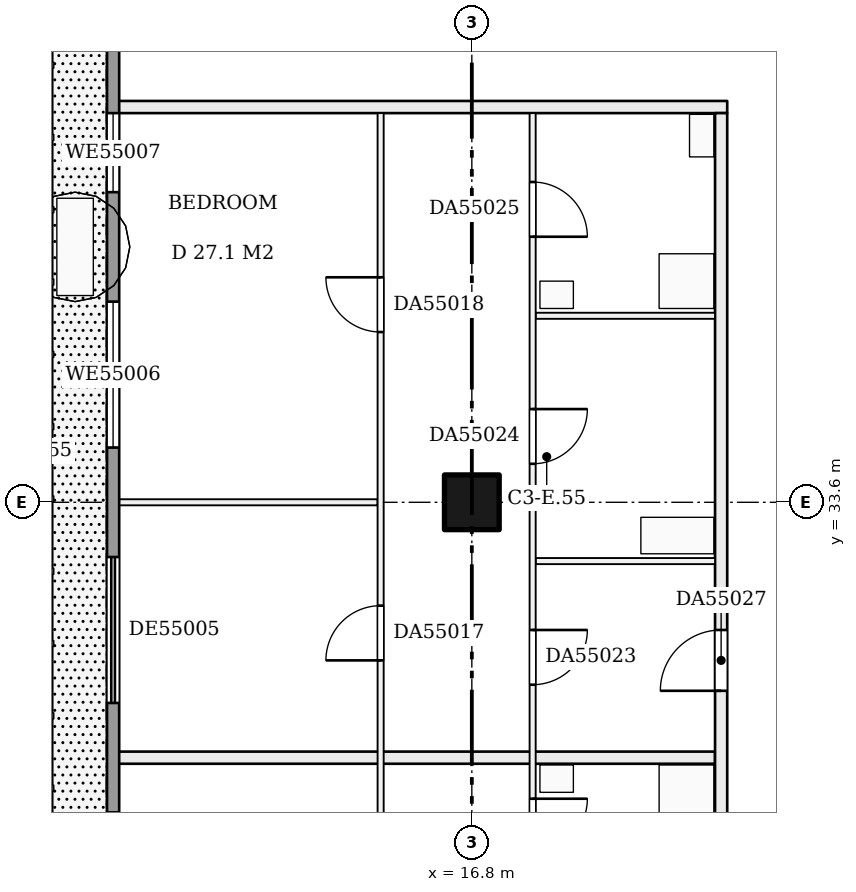
"""IFC4 building model, lengths in metres.
Left out: names, types, materials, properties, quantities, classifications, styles, units other than length and angle.
Written with IfcOpenShell. Run it as: python <this file> out.ifc"""

import sys

from ifc_helpers import new_model, si_unit, direction, frame, frame_2d, origin, origin_2d, place, context, subcontext, project, spatial, rectangle, extrude, element, fill, save


model = new_model("IFC4")
c1 = context("Model", 3, precision=1e-05, world=origin(), true_north=direction((0.0, 1.0)))
c2 = subcontext(c1, "Body", "Model", "MODEL_VIEW")
j1 = project(units=[si_unit("LENGTHUNIT", "METRE"), si_unit("PLANEANGLEUNIT", "RADIAN")], contexts=[c1])
p1 = place(None, origin())
s1 = spatial("IfcSite", under=j1, at=p1, CompositionType="ELEMENT")
p2 = place(p1, origin())
s2 = spatial("IfcBuilding", under=s1, at=p2, CompositionType="ELEMENT")
p3 = place(p2, frame((0.0, 0.0, 214.2)))
s3 = spatial("IfcBuildingStorey", under=s2, at=p3, CompositionType="ELEMENT", Elevation=214.2)
p4 = place(p3, frame((16.8, 33.6, 0.0), z_axis=(0.0, 0.0, 1.0), x_axis=(1.0, 0.0, 0.0)))
e1 = element("IfcColumn", 1, at=p4, inside=s3, PredefinedType="COLUMN", context=c2, shape_type="SweptSolid", body=[
    extrude(rectangle(XDim=0.9, YDim=0.9, at=origin_2d()), origin(), (0.0, 0.0, 1.0), 3.22),
])
p5 = place(p3, frame((10.9, 29.4, 0.0), z_axis=(0.0, 0.0, 1.0), x_axis=(1.0, 0.0, 0.0)))
e2 = element("IfcWall", 2, at=p5, inside=s3, PredefinedType="PARTITIONING", context=c2, shape_type="SweptSolid", body=[
    extrude(rectangle(XDim=9.9, YDim=0.2, at=frame_2d((4.95, 0.0))), origin(), (0.0, 0.0, 1.0), 3.22),
])
p6 = place(p3, frame((17.85, 32.633, 0.0), z_axis=(0.0, 0.0, 1.0), x_axis=(1.0, 0.0, 0.0)))
e3 = element("IfcWall", 3, at=p6, inside=s3, PredefinedType="PARTITIONING", context=c2, shape_type="SweptSolid", body=[
    extrude(rectangle(XDim=2.95, YDim=0.1, at=frame_2d((1.475, 0.0))), origin(), (0.0, 0.0, 1.0), 3.22),
])
p7 = place(p3, frame((10.9, 33.6, 0.0), z_axis=(0.0, 0.0, 1.0), x_axis=(1.0, 0.0, 0.0)))
e4 = element("IfcWall", 4, at=p7, inside=s3, PredefinedType="PARTITIONING", context=c2, shape_type="SweptSolid", body=[
    extrude(rectangle(XDim=4.35, YDim=0.1, at=frame_2d((2.175, 0.0))), origin(), (0.0, 0.0, 1.0), 3.22),
])
p8 = place(p3, frame((17.85, 36.667, 0.0), z_axis=(0.0, 0.0, 1.0), x_axis=(1.0, 0.0, 0.0)))
e5 = element("IfcWall", 5, at=p8, inside=s3, PredefinedType="PARTITIONING", context=c2, shape_type="SweptSolid", body=[
    extrude(rectangle(XDim=2.95, YDim=0.1, at=frame_2d((1.475, 0.0))), origin(), (0.0, 0.0, 1.0), 3.22),
])
p9 = place(p3, frame((10.9, 40.1, 0.0), z_axis=(0.0, 0.0, 1.0), x_axis=(1.0, 0.0, 0.0)))
e6 = element("IfcWall", 6, at=p9, inside=s3, PredefinedType="PARTITIONING", context=c2, shape_type="SweptSolid", body=[
    extrude(rectangle(XDim=10.1, YDim=0.2, at=frame_2d((5.05, 0.0))), origin(), (0.0, 0.0, 1.0), 3.22),
])
p10 = place(p3, frame((15.3, 21.0, 0.0), z_axis=(0.0, 0.0, 1.0), x_axis=(0.0, 1.0, 0.0)))
e7 = element("IfcWall", 7, at=p10, inside=s3, PredefinedType="PARTITIONING", context=c2, shape_type="SweptSolid", body=[
    extrude(rectangle(XDim=19.0, YDim=0.1, at=frame_2d((9.5, 0.0))), origin(), (0.0, 0.0, 1.0), 3.22),
])
p11 = place(p10, frame((1.6, 0.0, 0.0)))
e8 = element("IfcOpeningElement", 8, at=p11, cuts=e7, PredefinedType="OPENING", context=c2, shape_type="SweptSolid", body=[
    extrude(rectangle(XDim=0.9, YDim=2.1, at=frame_2d((0.45, 1.05))), frame((0.0, 0.06, 0.0), z_axis=(0.0, -1.0, 0.0), x_axis=(1.0, 0.0, 0.0)), (0.0, 0.0, 1.0), 0.12),
])
p12 = place(p10, frame((5.8, 0.0, 0.0)))
e9 = element("IfcOpeningElement", 9, at=p12, cuts=e7, PredefinedType="OPENING", context=c2, shape_type="SweptSolid", body=[
    extrude(rectangle(XDim=0.9, YDim=2.1, at=frame_2d((0.45, 1.05))), frame((0.0, 0.06, 0.0), z_axis=(0.0, -1.0, 0.0), x_axis=(1.0, 0.0, 0.0)), (0.0, 0.0, 1.0), 0.12),
])
p13 = place(p10, frame((10.0, 0.0, 0.0)))
e10 = element("IfcOpeningElement", 10, at=p13, cuts=e7, PredefinedType="OPENING", context=c2, shape_type="SweptSolid", body=[
    extrude(rectangle(XDim=0.9, YDim=2.1, at=frame_2d((0.45, 1.05))), frame((0.0, 0.06, 0.0), z_axis=(0.0, -1.0, 0.0), x_axis=(1.0, 0.0, 0.0)), (0.0, 0.0, 1.0), 0.12),
])
p14 = place(p10, frame((15.4, 0.0, 0.0)))
e11 = element("IfcOpeningElement", 11, at=p14, cuts=e7, PredefinedType="OPENING", context=c2, shape_type="SweptSolid", body=[
    extrude(rectangle(XDim=0.9, YDim=2.1, at=frame_2d((0.45, 1.05))), frame((0.0, 0.06, 0.0), z_axis=(0.0, -1.0, 0.0), x_axis=(1.0, 0.0, 0.0)), (0.0, 0.0, 1.0), 0.12),
])
p15 = place(p3, frame((17.8, 21.0, 0.0), z_axis=(0.0, 0.0, 1.0), x_axis=(0.0, 1.0, 0.0)))
e12 = element("IfcWall", 12, at=p15, inside=s3, PredefinedType="PARTITIONING", context=c2, shape_type="SweptSolid", body=[
    extrude(rectangle(XDim=19.0, YDim=0.1, at=frame_2d((9.5, 0.0))), origin(), (0.0, 0.0, 1.0), 3.22),
])
p16 = place(p15, frame((2.2, 0.0, 0.0)))
e13 = element("IfcOpeningElement", 13, at=p16, cuts=e12, PredefinedType="OPENING", context=c2, shape_type="SweptSolid", body=[
    extrude(rectangle(XDim=0.9, YDim=2.1, at=frame_2d((0.45, 1.05))), frame((0.0, 0.06, 0.0), z_axis=(0.0, -1.0, 0.0), x_axis=(1.0, 0.0, 0.0)), (0.0, 0.0, 1.0), 0.12),
])
p17 = place(p15, frame((0.3, 0.0, 0.0)))
e14 = element("IfcOpeningElement", 14, at=p17, cuts=e12, PredefinedType="OPENING", context=c2, shape_type="SweptSolid", body=[
    extrude(rectangle(XDim=0.9, YDim=2.1, at=frame_2d((0.45, 1.05))), frame((0.0, 0.06, 0.0), z_axis=(0.0, -1.0, 0.0), x_axis=(1.0, 0.0, 0.0)), (0.0, 0.0, 1.0), 0.12),
])
p18 = place(p15, frame((4.563, 0.0, 0.0)))
e15 = element("IfcOpeningElement", 15, at=p18, cuts=e12, PredefinedType="OPENING", context=c2, shape_type="SweptSolid", body=[
    extrude(rectangle(XDim=0.9, YDim=2.1, at=frame_2d((0.45, 1.05))), frame((0.0, 0.06, 0.0), z_axis=(0.0, -1.0, 0.0), x_axis=(1.0, 0.0, 0.0)), (0.0, 0.0, 1.0), 0.12),
])
p19 = place(p15, frame((6.825, 0.0, 0.0)))
e16 = element("IfcOpeningElement", 16, at=p19, cuts=e12, PredefinedType="OPENING", context=c2, shape_type="SweptSolid", body=[
    extrude(rectangle(XDim=0.9, YDim=2.1, at=frame_2d((0.45, 1.05))), frame((0.0, 0.06, 0.0), z_axis=(0.0, -1.0, 0.0), x_axis=(1.0, 0.0, 0.0)), (0.0, 0.0, 1.0), 0.12),
])
p20 = place(p15, frame((9.6, 0.0, 0.0)))
e17 = element("IfcOpeningElement", 17, at=p20, cuts=e12, PredefinedType="OPENING", context=c2, shape_type="SweptSolid", body=[
    extrude(rectangle(XDim=0.9, YDim=2.1, at=frame_2d((0.45, 1.05))), frame((0.0, 0.06, 0.0), z_axis=(0.0, -1.0, 0.0), x_axis=(1.0, 0.0, 0.0)), (0.0, 0.0, 1.0), 0.12),
])
p21 = place(p15, frame((13.233, 0.0, 0.0)))
e18 = element("IfcOpeningElement", 18, at=p21, cuts=e12, PredefinedType="OPENING", context=c2, shape_type="SweptSolid", body=[
    extrude(rectangle(XDim=0.9, YDim=2.1, at=frame_2d((0.45, 1.05))), frame((0.0, 0.06, 0.0), z_axis=(0.0, -1.0, 0.0), x_axis=(1.0, 0.0, 0.0)), (0.0, 0.0, 1.0), 0.12),
])
p22 = place(p15, frame((16.967, 0.0, 0.0)))
e19 = element("IfcOpeningElement", 19, at=p22, cuts=e12, PredefinedType="OPENING", context=c2, shape_type="SweptSolid", body=[
    extrude(rectangle(XDim=0.9, YDim=2.1, at=frame_2d((0.45, 1.05))), frame((0.0, 0.06, 0.0), z_axis=(0.0, -1.0, 0.0), x_axis=(1.0, 0.0, 0.0)), (0.0, 0.0, 1.0), 0.12),
])
p23 = place(p3, frame((20.9, 22.8, 0.0), z_axis=(0.0, 0.0, 1.0), x_axis=(0.0, 1.0, 0.0)))
e20 = element("IfcWall", 20, at=p23, inside=s3, PredefinedType="PARTITIONING", context=c2, shape_type="SweptSolid", body=[
    extrude(rectangle(XDim=17.2, YDim=0.2, at=frame_2d((8.6, 0.0))), origin(), (0.0, 0.0, 1.0), 3.22),
])
p24 = place(p23, frame((0.3, 0.0, 0.0)))
e21 = element("IfcOpeningElement", 21, at=p24, cuts=e20, PredefinedType="OPENING", context=c2, shape_type="SweptSolid", body=[
    extrude(rectangle(XDim=1.0, YDim=2.1, at=frame_2d((0.5, 1.05))), frame((0.0, 0.11, 0.0), z_axis=(0.0, -1.0, 0.0), x_axis=(1.0, 0.0, 0.0)), (0.0, 0.0, 1.0), 0.22),
])
p25 = place(p23, frame((7.7, 0.0, 0.0)))
e22 = element("IfcOpeningElement", 22, at=p25, cuts=e20, PredefinedType="OPENING", context=c2, shape_type="SweptSolid", body=[
    extrude(rectangle(XDim=1.0, YDim=2.1, at=frame_2d((0.5, 1.05))), frame((0.0, 0.11, 0.0), z_axis=(0.0, -1.0, 0.0), x_axis=(1.0, 0.0, 0.0)), (0.0, 0.0, 1.0), 0.22),
])
p26 = place(p3, frame((10.9, 42.0, 0.0), z_axis=(0.0, 0.0, 1.0), x_axis=(0.0, -1.0, 0.0)))
e23 = element("IfcWall", 23, at=p26, inside=s3, PredefinedType="SOLIDWALL", context=c2, shape_type="SweptSolid", body=[
    extrude(rectangle(XDim=28.6, YDim=0.2, at=frame_2d((14.3, 0.0))), origin(), (0.0, 0.0, 1.0), 3.22),
])
p27 = place(p26, frame((25.9, 0.0, 0.0)))
e24 = element("IfcOpeningElement", 24, at=p27, cuts=e23, PredefinedType="OPENING", context=c2, shape_type="SweptSolid", body=[
    extrude(rectangle(XDim=2.4, YDim=2.2, at=frame_2d((1.2, 1.1))), frame((0.0, 0.11, 0.0), z_axis=(0.0, -1.0, 0.0), x_axis=(1.0, 0.0, 0.0)), (0.0, 0.0, 1.0), 0.22),
])
p28 = place(p26, frame((21.9, 0.0, 0.0)))
e25 = element("IfcOpeningElement", 25, at=p28, cuts=e23, PredefinedType="OPENING", context=c2, shape_type="SweptSolid", body=[
    extrude(rectangle(XDim=2.4, YDim=2.2, at=frame_2d((1.2, 1.1))), frame((0.0, 0.11, 0.0), z_axis=(0.0, -1.0, 0.0), x_axis=(1.0, 0.0, 0.0)), (0.0, 0.0, 1.0), 0.22),
])
p29 = place(p26, frame((17.7, 0.0, 0.0)))
e26 = element("IfcOpeningElement", 26, at=p29, cuts=e23, PredefinedType="OPENING", context=c2, shape_type="SweptSolid", body=[
    extrude(rectangle(XDim=2.4, YDim=2.2, at=frame_2d((1.2, 1.1))), frame((0.0, 0.11, 0.0), z_axis=(0.0, -1.0, 0.0), x_axis=(1.0, 0.0, 0.0)), (0.0, 0.0, 1.0), 0.22),
])
p30 = place(p26, frame((13.5, 0.0, 0.9)))
e27 = element("IfcOpeningElement", 27, at=p30, cuts=e23, PredefinedType="OPENING", context=c2, shape_type="SweptSolid", body=[
    extrude(rectangle(XDim=2.4, YDim=1.5, at=frame_2d((1.2, 0.75))), frame((0.0, 0.11, 0.0), z_axis=(0.0, -1.0, 0.0), x_axis=(1.0, 0.0, 0.0)), (0.0, 0.0, 1.0), 0.22),
])
p31 = place(p26, frame((9.3, 0.0, 0.0)))
e28 = element("IfcOpeningElement", 28, at=p31, cuts=e23, PredefinedType="OPENING", context=c2, shape_type="SweptSolid", body=[
    extrude(rectangle(XDim=2.4, YDim=2.2, at=frame_2d((1.2, 1.1))), frame((0.0, 0.11, 0.0), z_axis=(0.0, -1.0, 0.0), x_axis=(1.0, 0.0, 0.0)), (0.0, 0.0, 1.0), 0.22),
])
p32 = place(p26, frame((5.1, 0.0, 0.9)))
e29 = element("IfcOpeningElement", 29, at=p32, cuts=e23, PredefinedType="OPENING", context=c2, shape_type="SweptSolid", body=[
    extrude(rectangle(XDim=2.4, YDim=1.5, at=frame_2d((1.2, 0.75))), frame((0.0, 0.11, 0.0), z_axis=(0.0, -1.0, 0.0), x_axis=(1.0, 0.0, 0.0)), (0.0, 0.0, 1.0), 0.22),
])
p33 = place(p26, frame((2.0, 0.0, 0.9)))
e30 = element("IfcOpeningElement", 30, at=p33, cuts=e23, PredefinedType="OPENING", context=c2, shape_type="SweptSolid", body=[
    extrude(rectangle(XDim=1.3, YDim=1.5, at=frame_2d((0.65, 0.75))), frame((0.0, 0.11, 0.0), z_axis=(0.0, -1.0, 0.0), x_axis=(1.0, 0.0, 0.0)), (0.0, 0.0, 1.0), 0.22),
])
p34 = place(p13, origin())
e31 = element("IfcDoor", 31, at=p34, inside=s3, OperationType="SINGLE_SWING_LEFT", PredefinedType="DOOR", context=c2, shape_type="SweptSolid", body=[
    extrude(rectangle(XDim=0.9, YDim=2.1, at=frame_2d((0.45, 1.05))), frame((0.0, 0.025, 0.0), z_axis=(0.0, -1.0, 0.0), x_axis=(1.0, 0.0, 0.0)), (0.0, 0.0, 1.0), 0.05),
])
fill(e10, e31)
p35 = place(p14, origin())
e32 = element("IfcDoor", 32, at=p35, inside=s3, OperationType="SINGLE_SWING_RIGHT", PredefinedType="DOOR", context=c2, shape_type="SweptSolid", body=[
    extrude(rectangle(XDim=0.9, YDim=2.1, at=frame_2d((0.45, 1.05))), frame((0.0, 0.025, 0.0), z_axis=(0.0, -1.0, 0.0), x_axis=(1.0, 0.0, 0.0)), (0.0, 0.0, 1.0), 0.05),
])
fill(e11, e32)
p36 = place(p19, frame((0.9, 0.0, 0.0), z_axis=(0.0, 0.0, 1.0), x_axis=(-1.0, 0.0, 0.0)))
e33 = element("IfcDoor", 33, at=p36, inside=s3, OperationType="SINGLE_SWING_LEFT", PredefinedType="DOOR", context=c2, shape_type="SweptSolid", body=[
    extrude(rectangle(XDim=0.9, YDim=2.1, at=frame_2d((0.45, 1.05))), frame((0.0, 0.025, 0.0), z_axis=(0.0, -1.0, 0.0), x_axis=(1.0, 0.0, 0.0)), (0.0, 0.0, 1.0), 0.05),
])
fill(e16, e33)
p37 = place(p20, frame((0.9, 0.0, 0.0), z_axis=(0.0, 0.0, 1.0), x_axis=(-1.0, 0.0, 0.0)))
e34 = element("IfcDoor", 34, at=p37, inside=s3, OperationType="SINGLE_SWING_LEFT", PredefinedType="DOOR", context=c2, shape_type="SweptSolid", body=[
    extrude(rectangle(XDim=0.9, YDim=2.1, at=frame_2d((0.45, 1.05))), frame((0.0, 0.025, 0.0), z_axis=(0.0, -1.0, 0.0), x_axis=(1.0, 0.0, 0.0)), (0.0, 0.0, 1.0), 0.05),
])
fill(e17, e34)
p38 = place(p21, frame((0.9, 0.0, 0.0), z_axis=(0.0, 0.0, 1.0), x_axis=(-1.0, 0.0, 0.0)))
e35 = element("IfcDoor", 35, at=p38, inside=s3, OperationType="SINGLE_SWING_LEFT", PredefinedType="DOOR", context=c2, shape_type="SweptSolid", body=[
    extrude(rectangle(XDim=0.9, YDim=2.1, at=frame_2d((0.45, 1.05))), frame((0.0, 0.025, 0.0), z_axis=(0.0, -1.0, 0.0), x_axis=(1.0, 0.0, 0.0)), (0.0, 0.0, 1.0), 0.05),
])
fill(e18, e35)
p39 = place(p22, frame((0.9, 0.0, 0.0), z_axis=(0.0, 0.0, 1.0), x_axis=(-1.0, 0.0, 0.0)))
e36 = element("IfcDoor", 36, at=p39, inside=s3, OperationType="SINGLE_SWING_RIGHT", PredefinedType="DOOR", context=c2, shape_type="SweptSolid", body=[
    extrude(rectangle(XDim=0.9, YDim=2.1, at=frame_2d((0.45, 1.05))), frame((0.0, 0.025, 0.0), z_axis=(0.0, -1.0, 0.0), x_axis=(1.0, 0.0, 0.0)), (0.0, 0.0, 1.0), 0.05),
])
fill(e19, e36)
p40 = place(p25, origin())
e37 = element("IfcDoor", 37, at=p40, inside=s3, OperationType="SINGLE_SWING_LEFT", PredefinedType="DOOR", context=c2, shape_type="SweptSolid", body=[
    extrude(rectangle(XDim=1.0, YDim=2.1, at=frame_2d((0.5, 1.05))), frame((0.0, 0.025, 0.0), z_axis=(0.0, -1.0, 0.0), x_axis=(1.0, 0.0, 0.0)), (0.0, 0.0, 1.0), 0.05),
])
fill(e22, e37)
p41 = place(p31, origin())
e38 = element("IfcDoor", 38, at=p41, inside=s3, OperationType="DOUBLE_DOOR_SLIDING", PredefinedType="DOOR", context=c2, shape_type="SweptSolid", body=[
    extrude(rectangle(XDim=2.4, YDim=2.2, at=frame_2d((1.2, 1.1))), frame((0.0, 0.025, 0.0), z_axis=(0.0, -1.0, 0.0), x_axis=(1.0, 0.0, 0.0)), (0.0, 0.0, 1.0), 0.05),
])
fill(e28, e38)
p42 = place(p32, origin())
e39 = element("IfcWindow", 39, at=p42, inside=s3, PartitioningType="SINGLE_PANEL", PredefinedType="WINDOW", context=c2, shape_type="SweptSolid", body=[
    extrude(rectangle(XDim=2.4, YDim=1.5, at=frame_2d((1.2, 0.75))), frame((0.0, 0.03, 0.0), z_axis=(0.0, -1.0, 0.0), x_axis=(1.0, 0.0, 0.0)), (0.0, 0.0, 1.0), 0.06),
])
fill(e29, e39)
p43 = place(p33, origin())
e40 = element("IfcWindow", 40, at=p43, inside=s3, PartitioningType="SINGLE_PANEL", PredefinedType="WINDOW", context=c2, shape_type="SweptSolid", body=[
    extrude(rectangle(XDim=1.3, YDim=1.5, at=frame_2d((0.65, 0.75))), frame((0.0, 0.03, 0.0), z_axis=(0.0, -1.0, 0.0), x_axis=(1.0, 0.0, 0.0)), (0.0, 0.0, 1.0), 0.06),
])
fill(e30, e40)
save(model, sys.argv[1])
